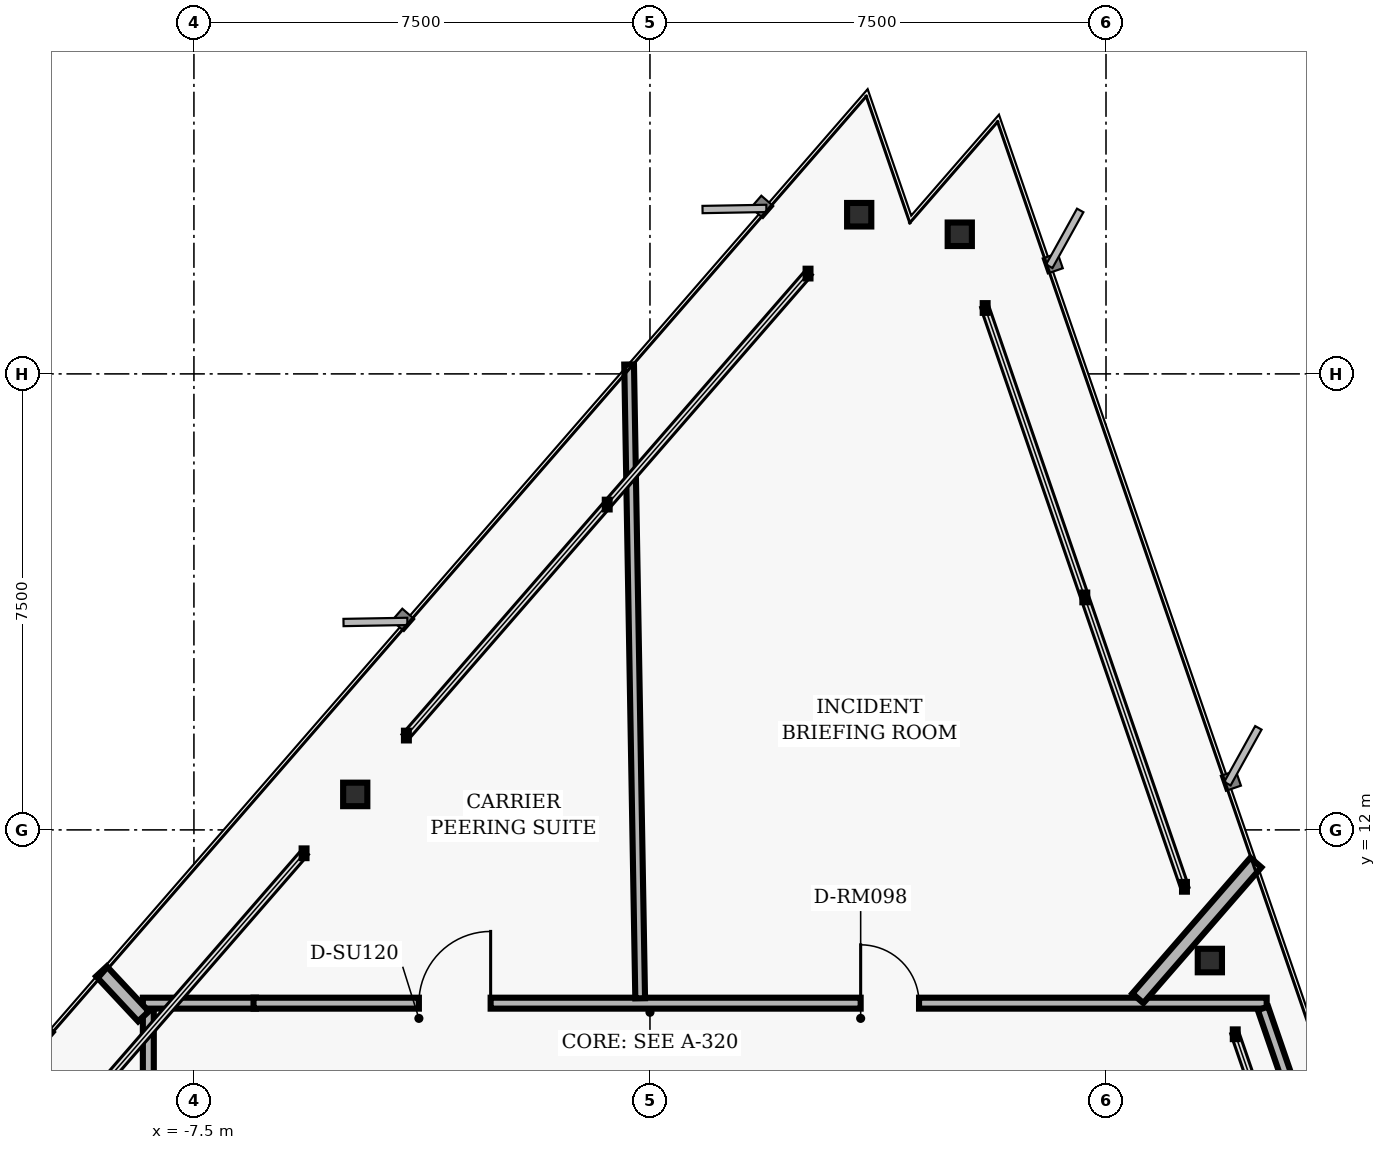
"""IFC4 building model, lengths in metres.
Left out: names, types, materials, properties, quantities, classifications, styles, units other than length and angle.
Written with IfcOpenShell. Run it as: python <this file> out.ifc"""

import sys

from ifc_helpers import new_model, si_unit, direction, frame, frame_2d, origin, origin_2d, place, context, subcontext, project, spatial, rectangle, i_section, extrude, element, fill, save


model = new_model("IFC4")
c1 = context("Model", 3, precision=1e-05, world=origin(), true_north=direction((0.0, 1.0)))
c2 = subcontext(c1, "Body", "Model", "MODEL_VIEW")
j1 = project(units=[si_unit("LENGTHUNIT", "METRE"), si_unit("PLANEANGLEUNIT", "RADIAN")], contexts=[c1])
p1 = place(None, origin())
s1 = spatial("IfcSite", under=j1, at=p1, CompositionType="ELEMENT")
p2 = place(p1, origin())
s2 = spatial("IfcBuilding", under=s1, at=p2, CompositionType="ELEMENT")
p3 = place(p2, frame((0.0, 0.0, 159.36)))
s3 = spatial("IfcBuildingStorey", under=s2, at=p3, CompositionType="ELEMENT", Elevation=159.36)
for number, where, z_axis, x_axis in (
    (1, (9.208, 9.851, 0.0), (0.0, 0.0, 1.0), (1.0, 0.0, 0.0)),
    (2, (5.095, 21.796, 0.0), (0.0, 0.0, 1.0), (1.0, 0.0, 0.0)),
    (3, (3.441, 22.118, 0.0), (0.0, 0.0, 1.0), (1.0, 0.0, 0.0)),
    (4, (-4.847, 12.583, 0.0), (0.0, 0.0, 1.0), (1.0, 0.0, 0.0)),
):
    element("IfcColumn", number, at=place(p3, frame(where, z_axis=z_axis, x_axis=x_axis)), inside=s3, PredefinedType="COLUMN", context=c2, shape_type="SweptSolid", body=[
        extrude(i_section(OverallWidth=0.398, OverallDepth=0.387, WebThickness=0.021, FlangeThickness=0.033, FilletRadius=0.018, at=origin_2d()), origin(), (0.0, 0.0, 1.0), 3.04),
    ])
p4 = place(p3, frame((-8.25, 7.18, 0.0), z_axis=(0.0, 0.0, 1.0), x_axis=(0.0, 1.0, 0.0)))
e5 = element("IfcWall", 5, at=p4, inside=s3, PredefinedType="PARTITIONING", context=c2, shape_type="SweptSolid", body=[
    extrude(rectangle(XDim=1.88, YDim=0.18, at=frame_2d((0.94, 0.0))), origin(), (0.0, 0.0, 1.0), 2.763),
])
p5 = place(p3, frame((-8.34, 9.15, 0.0), z_axis=(0.0, 0.0, 1.0), x_axis=(1.0, 0.0, 0.0)))
e6 = element("IfcWall", 6, at=p5, inside=s3, PredefinedType="PARTITIONING", context=c2, shape_type="SweptSolid", body=[
    extrude(rectangle(XDim=1.86, YDim=0.18, at=frame_2d((0.93, 0.0))), origin(), (0.0, 0.0, 1.0), 2.763),
])
p6 = place(p3, frame((-6.52, 9.15, 0.0), z_axis=(0.0, 0.0, 1.0), x_axis=(1.0, 0.0, 0.0)))
e7 = element("IfcWall", 7, at=p6, inside=s3, PredefinedType="PARTITIONING", context=c2, shape_type="SweptSolid", body=[
    extrude(rectangle(XDim=16.662, YDim=0.18, at=frame_2d((8.331, 0.0))), origin(), (0.0, 0.0, 1.0), 2.763),
])
p7 = place(p6, frame((9.985, 0.0, 0.0)))
e8 = element("IfcOpeningElement", 8, at=p7, cuts=e7, PredefinedType="OPENING", context=c2, shape_type="SweptSolid", body=[
    extrude(rectangle(XDim=0.96, YDim=2.02, at=frame_2d((0.48, 1.01))), frame((0.0, 0.1, 0.0), z_axis=(0.0, -1.0, 0.0), x_axis=(1.0, 0.0, 0.0)), (0.0, 0.0, 1.0), 0.2),
])
p8 = place(p6, frame((2.719, 0.0, 0.0)))
e9 = element("IfcOpeningElement", 9, at=p8, cuts=e7, PredefinedType="OPENING", context=c2, shape_type="SweptSolid", body=[
    extrude(rectangle(XDim=1.18, YDim=2.02, at=frame_2d((0.59, 1.01))), frame((0.0, 0.1, 0.0), z_axis=(0.0, -1.0, 0.0), x_axis=(1.0, 0.0, 0.0)), (0.0, 0.0, 1.0), 0.2),
])
p9 = place(p3, frame((10.082, 9.065, 0.0), z_axis=(0.0, 0.0, 1.0), x_axis=(0.325550958337, -0.945524496524, 0.0)))
e10 = element("IfcWall", 10, at=p9, inside=s3, PredefinedType="PARTITIONING", context=c2, shape_type="SweptSolid", body=[
    extrude(rectangle(XDim=1.882, YDim=0.18, at=frame_2d((0.941, 0.0))), origin(), (0.0, 0.0, 1.0), 2.763),
])
p10 = place(p3, frame((8.023, 9.23, 0.0), z_axis=(0.0, 0.0, 1.0), x_axis=(0.656082692906, 0.754689008844, 0.0)))
e11 = element("IfcWall", 11, at=p10, inside=s3, PredefinedType="PARTITIONING", context=c2, shape_type="SweptSolid", body=[
    extrude(rectangle(XDim=2.959, YDim=0.24, at=frame_2d((1.479, 0.0))), origin(), (0.0, 0.0, 1.0), 2.763),
])
p11 = place(p3, frame((-0.161, 9.23, 0.0), z_axis=(0.0, 0.0, 1.0), x_axis=(-0.017444651843, 0.999847830483, 0.0)))
e12 = element("IfcWall", 12, at=p11, inside=s3, PredefinedType="PARTITIONING", context=c2, shape_type="SweptSolid", body=[
    extrude(rectangle(XDim=10.426, YDim=0.16, at=frame_2d((5.213, 0.0))), origin(), (0.0, 0.0, 1.0), 2.763),
])
p12 = place(p3, frame((-8.33, 8.933, 0.0), z_axis=(0.0, 0.0, 1.0), x_axis=(-0.68206891796, 0.731287898952, 0.0)))
e13 = element("IfcWall", 13, at=p12, inside=s3, PredefinedType="PARTITIONING", context=c2, shape_type="SweptSolid", body=[
    extrude(rectangle(XDim=1.012, YDim=0.24, at=frame_2d((0.506, 0.0))), origin(), (0.0, 0.0, 1.0), 2.763),
])
p13 = place(p7, origin())
e14 = element("IfcDoor", 14, at=p13, inside=s3, OperationType="SINGLE_SWING_LEFT", PredefinedType="DOOR", context=c2, shape_type="SweptSolid", body=[
    extrude(rectangle(XDim=0.96, YDim=2.02, at=frame_2d((0.48, 1.01))), frame((0.0, 0.025, 0.0), z_axis=(0.0, -1.0, 0.0), x_axis=(1.0, 0.0, 0.0)), (0.0, 0.0, 1.0), 0.05),
])
fill(e8, e14)
p14 = place(p8, origin())
e15 = element("IfcDoor", 15, at=p14, inside=s3, OperationType="SINGLE_SWING_RIGHT", PredefinedType="DOOR", context=c2, shape_type="SweptSolid", body=[
    extrude(rectangle(XDim=1.18, YDim=2.02, at=frame_2d((0.59, 1.01))), frame((0.0, 0.025, 0.0), z_axis=(0.0, -1.0, 0.0), x_axis=(1.0, 0.0, 0.0)), (0.0, 0.0, 1.0), 0.05),
])
fill(e9, e15)
save(model, sys.argv[1])
